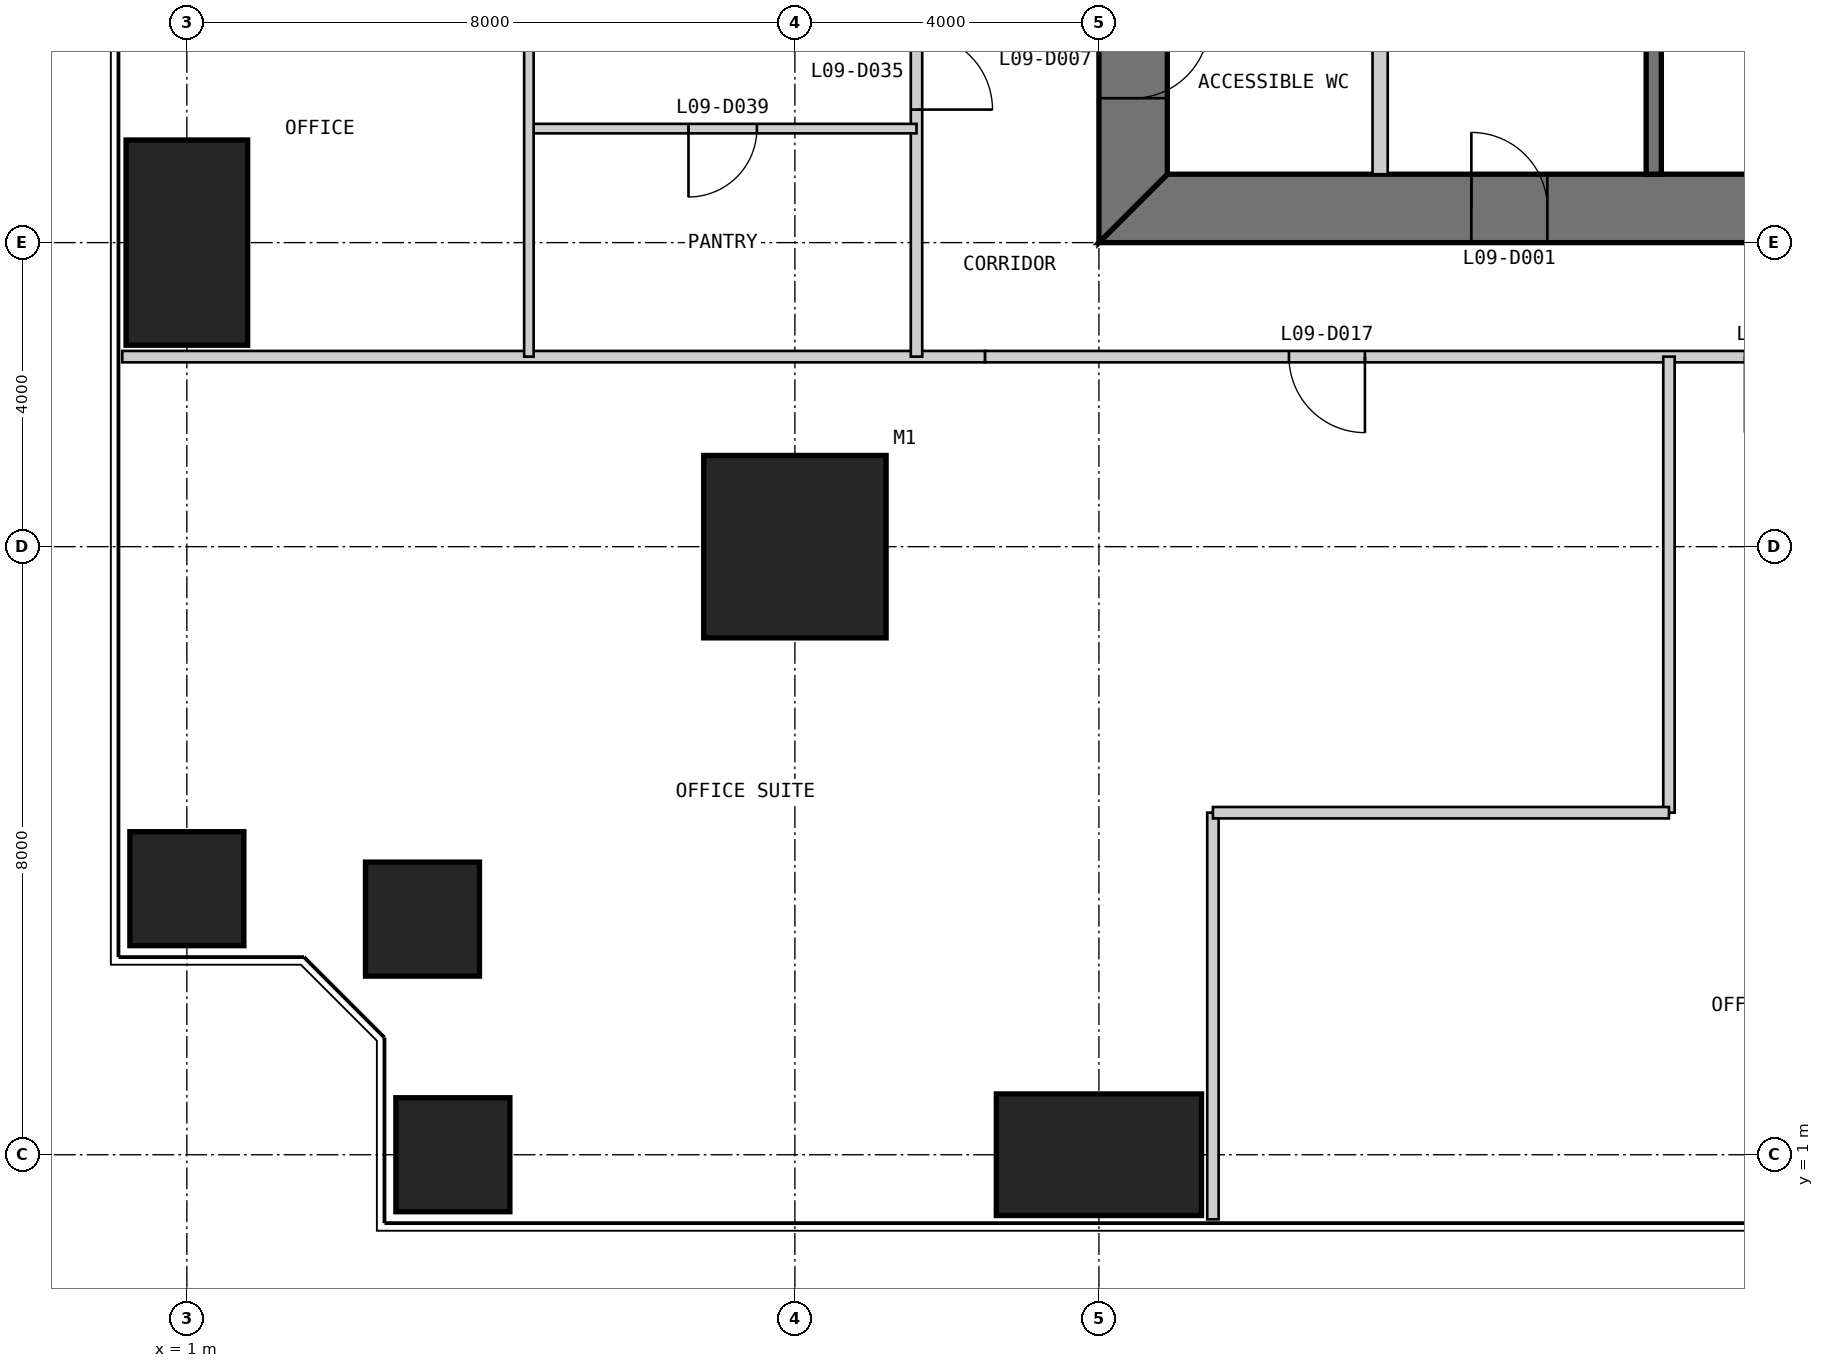
"""IFC4 building model, lengths in metres.
Left out: names, types, materials, properties, quantities, classifications, styles, units other than length and angle.
Written with IfcOpenShell. Run it as: python <this file> out.ifc"""

import sys

from ifc_helpers import new_model, si_unit, direction, frame, frame_2d, origin, origin_2d, place, context, subcontext, project, spatial, polyline, rectangle, outline, extrude, element, fill, save


model = new_model("IFC4")
c1 = context("Model", 3, precision=1e-05, world=origin(), true_north=direction((0.0, 1.0)))
c2 = subcontext(c1, "Body", "Model", "MODEL_VIEW")
j1 = project(units=[si_unit("LENGTHUNIT", "METRE"), si_unit("PLANEANGLEUNIT", "RADIAN")], contexts=[c1])
p1 = place(None, origin())
s1 = spatial("IfcSite", under=j1, at=p1, CompositionType="ELEMENT")
p2 = place(p1, origin())
s2 = spatial("IfcBuilding", under=s1, at=p2, CompositionType="ELEMENT")
p3 = place(p2, frame((0.0, 0.0, 43.0)))
s3 = spatial("IfcBuildingStorey", under=s2, at=p3, CompositionType="ELEMENT", Elevation=43.0)
p4 = place(p3, frame((9.0, 9.0, 0.0), z_axis=(0.0, 0.0, 1.0), x_axis=(1.0, 0.0, 0.0)))
e1 = element("IfcColumn", 1, at=p4, inside=s3, PredefinedType="COLUMN", context=c2, shape_type="SweptSolid", body=[
    extrude(rectangle(XDim=2.4, YDim=2.4, at=origin_2d()), origin(), (0.0, 0.0, 1.0), 4.0),
])
p5 = place(p3, frame((4.5, 1.0, 0.0), z_axis=(0.0, 0.0, 1.0), x_axis=(1.0, 0.0, 0.0)))
e2 = element("IfcColumn", 2, at=p5, inside=s3, PredefinedType="COLUMN", context=c2, shape_type="SweptSolid", body=[
    extrude(rectangle(XDim=1.5, YDim=1.5, at=origin_2d()), origin(), (0.0, 0.0, 1.0), 4.0),
])
p6 = place(p3, frame((13.0, 1.0, 0.0), z_axis=(0.0, 0.0, 1.0), x_axis=(1.0, 0.0, 0.0)))
e3 = element("IfcColumn", 3, at=p6, inside=s3, PredefinedType="COLUMN", context=c2, shape_type="SweptSolid", body=[
    extrude(rectangle(XDim=2.7, YDim=1.6, at=origin_2d()), origin(), (0.0, 0.0, 1.0), 4.0),
])
p7 = place(p3, frame((1.0, 13.0, 0.0), z_axis=(0.0, 0.0, 1.0), x_axis=(1.0, 0.0, 0.0)))
e4 = element("IfcColumn", 4, at=p7, inside=s3, PredefinedType="COLUMN", context=c2, shape_type="SweptSolid", body=[
    extrude(rectangle(XDim=1.6, YDim=2.7, at=origin_2d()), origin(), (0.0, 0.0, 1.0), 4.0),
])
for number, where, z_axis, x_axis in (
    (5, (1.0, 4.5, 0.0), (0.0, 0.0, 1.0), (1.0, 0.0, 0.0)),
    (6, (4.1, 4.1, 0.0), (0.0, 0.0, 1.0), (1.0, 0.0, 0.0)),
):
    element("IfcColumn", number, at=place(p3, frame(where, z_axis=z_axis, x_axis=x_axis)), inside=s3, PredefinedType="COLUMN", context=c2, shape_type="SweptSolid", body=[
        extrude(rectangle(XDim=1.5, YDim=1.5, at=origin_2d()), origin(), (0.0, 0.0, 1.0), 4.0),
    ])
p8 = place(p3, frame((13.0, 13.45, 0.0), z_axis=(0.0, 0.0, 1.0), x_axis=(1.0, 0.0, 0.0)))
e7 = element("IfcWall", 7, at=p8, inside=s3, PredefinedType="SHEAR", context=c2, shape_type="SweptSolid", body=[
    extrude(outline(polyline([(0.0, -0.45), (24.0, -0.45), (23.1, 0.45), (0.9, 0.45), (0.0, -0.45)])), origin(), (0.0, 0.0, 1.0), 4.0),
])
p9 = place(p8, frame((4.9, 0.0, 0.0)))
e8 = element("IfcOpeningElement", 8, at=p9, cuts=e7, PredefinedType="OPENING", context=c2, shape_type="SweptSolid", body=[
    extrude(rectangle(XDim=1.0, YDim=2.2, at=frame_2d((0.5, 1.1))), frame((0.0, 0.46, 0.0), z_axis=(0.0, -1.0, 0.0), x_axis=(1.0, 0.0, 0.0)), (0.0, 0.0, 1.0), 0.92),
])
p10 = place(p8, frame((8.9, 0.0, 0.0)))
e9 = element("IfcOpeningElement", 9, at=p10, cuts=e7, PredefinedType="OPENING", context=c2, shape_type="SweptSolid", body=[
    extrude(rectangle(XDim=1.1, YDim=2.2, at=frame_2d((0.55, 1.1))), frame((0.0, 0.46, 0.0), z_axis=(0.0, -1.0, 0.0), x_axis=(1.0, 0.0, 0.0)), (0.0, 0.0, 1.0), 0.92),
])
p11 = place(p8, frame((15.05, 0.0, 0.0)))
e10 = element("IfcOpeningElement", 10, at=p11, cuts=e7, PredefinedType="OPENING", context=c2, shape_type="SweptSolid", body=[
    extrude(rectangle(XDim=0.9, YDim=2.2, at=frame_2d((0.45, 1.1))), frame((0.0, 0.46, 0.0), z_axis=(0.0, -1.0, 0.0), x_axis=(1.0, 0.0, 0.0)), (0.0, 0.0, 1.0), 0.92),
])
p12 = place(p8, frame((17.9, 0.0, 0.0)))
e11 = element("IfcOpeningElement", 11, at=p12, cuts=e7, PredefinedType="OPENING", context=c2, shape_type="SweptSolid", body=[
    extrude(rectangle(XDim=1.0, YDim=2.2, at=frame_2d((0.5, 1.1))), frame((0.0, 0.46, 0.0), z_axis=(0.0, -1.0, 0.0), x_axis=(1.0, 0.0, 0.0)), (0.0, 0.0, 1.0), 0.92),
])
p13 = place(p8, frame((21.4, 0.0, 0.0)))
e12 = element("IfcOpeningElement", 12, at=p13, cuts=e7, PredefinedType="OPENING", context=c2, shape_type="SweptSolid", body=[
    extrude(rectangle(XDim=1.0, YDim=2.2, at=frame_2d((0.5, 1.1))), frame((0.0, 0.46, 0.0), z_axis=(0.0, -1.0, 0.0), x_axis=(1.0, 0.0, 0.0)), (0.0, 0.0, 1.0), 0.92),
])
p14 = place(p3, frame((13.45, 36.1, 0.0), z_axis=(0.0, 0.0, 1.0), x_axis=(0.0, -1.0, 0.0)))
e13 = element("IfcWall", 13, at=p14, inside=s3, PredefinedType="SHEAR", context=c2, shape_type="SweptSolid", body=[
    extrude(outline(polyline([(-0.9, -0.45), (23.1, -0.45), (22.2, 0.45), (0.0, 0.45), (-0.9, -0.45)])), origin(), (0.0, 0.0, 1.0), 4.0),
])
p15 = place(p14, frame((20.2, 0.0, 0.0)))
e14 = element("IfcOpeningElement", 14, at=p15, cuts=e13, PredefinedType="OPENING", context=c2, shape_type="SweptSolid", body=[
    extrude(rectangle(XDim=1.0, YDim=2.2, at=frame_2d((0.5, 1.1))), frame((0.0, 0.46, 0.0), z_axis=(0.0, -1.0, 0.0), x_axis=(1.0, 0.0, 0.0)), (0.0, 0.0, 1.0), 0.92),
])
p16 = place(p14, frame((17.25, 0.0, 0.0)))
e15 = element("IfcOpeningElement", 15, at=p16, cuts=e13, PredefinedType="OPENING", context=c2, shape_type="SweptSolid", body=[
    extrude(rectangle(XDim=0.9, YDim=2.2, at=frame_2d((0.45, 1.1))), frame((0.0, 0.46, 0.0), z_axis=(0.0, -1.0, 0.0), x_axis=(1.0, 0.0, 0.0)), (0.0, 0.0, 1.0), 0.92),
])
p17 = place(p3, frame((16.7, 13.9, 0.0), z_axis=(0.0, 0.0, 1.0), x_axis=(0.0, 1.0, 0.0)))
e16 = element("IfcWall", 16, at=p17, inside=s3, PredefinedType="PARTITIONING", context=c2, shape_type="SweptSolid", body=[
    extrude(rectangle(XDim=16.1, YDim=0.2, at=frame_2d((8.05, 0.0))), origin(), (0.0, 0.0, 1.0), 3.8),
])
p18 = place(p17, frame((7.217, 0.0, 0.0)))
e17 = element("IfcOpeningElement", 17, at=p18, cuts=e16, PredefinedType="OPENING", context=c2, shape_type="SweptSolid", body=[
    extrude(rectangle(XDim=1.1, YDim=2.2, at=frame_2d((0.55, 1.1))), frame((0.0, 0.11, 0.0), z_axis=(0.0, -1.0, 0.0), x_axis=(1.0, 0.0, 0.0)), (0.0, 0.0, 1.0), 0.22),
])
p19 = place(p17, frame((10.55, 0.0, 0.0)))
e18 = element("IfcOpeningElement", 18, at=p19, cuts=e16, PredefinedType="OPENING", context=c2, shape_type="SweptSolid", body=[
    extrude(rectangle(XDim=1.1, YDim=2.2, at=frame_2d((0.55, 1.1))), frame((0.0, 0.11, 0.0), z_axis=(0.0, -1.0, 0.0), x_axis=(1.0, 0.0, 0.0)), (0.0, 0.0, 1.0), 0.22),
])
p20 = place(p17, frame((13.883, 0.0, 0.0)))
e19 = element("IfcOpeningElement", 19, at=p20, cuts=e16, PredefinedType="OPENING", context=c2, shape_type="SweptSolid", body=[
    extrude(rectangle(XDim=1.1, YDim=2.2, at=frame_2d((0.55, 1.1))), frame((0.0, 0.11, 0.0), z_axis=(0.0, -1.0, 0.0), x_axis=(1.0, 0.0, 0.0)), (0.0, 0.0, 1.0), 0.22),
])
p21 = place(p3, frame((20.3, 13.9, 0.0), z_axis=(0.0, 0.0, 1.0), x_axis=(0.0, 1.0, 0.0)))
e20 = element("IfcWall", 20, at=p21, inside=s3, PredefinedType="SOLIDWALL", context=c2, shape_type="SweptSolid", body=[
    extrude(rectangle(XDim=16.1, YDim=0.2, at=frame_2d((8.05, 0.0))), origin(), (0.0, 0.0, 1.0), 3.8),
])
p22 = place(p3, frame((11.5, 11.5, 0.0), z_axis=(0.0, 0.0, 1.0), x_axis=(1.0, 0.0, 0.0)))
e21 = element("IfcWall", 21, at=p22, inside=s3, PredefinedType="PARTITIONING", context=c2, shape_type="SweptSolid", body=[
    extrude(rectangle(XDim=27.0, YDim=0.15, at=frame_2d((13.5, 0.0))), origin(), (0.0, 0.0, 1.0), 3.85),
])
p23 = place(p22, frame((4.0, 0.0, 0.0)))
e22 = element("IfcOpeningElement", 22, at=p23, cuts=e21, PredefinedType="OPENING", context=c2, shape_type="SweptSolid", body=[
    extrude(rectangle(XDim=1.0, YDim=2.2, at=frame_2d((0.5, 1.1))), frame((0.0, 0.085, 0.0), z_axis=(0.0, -1.0, 0.0), x_axis=(1.0, 0.0, 0.0)), (0.0, 0.0, 1.0), 0.17),
])
p24 = place(p22, frame((10.0, 0.0, 0.0)))
e23 = element("IfcOpeningElement", 23, at=p24, cuts=e21, PredefinedType="OPENING", context=c2, shape_type="SweptSolid", body=[
    extrude(rectangle(XDim=1.0, YDim=2.2, at=frame_2d((0.5, 1.1))), frame((0.0, 0.085, 0.0), z_axis=(0.0, -1.0, 0.0), x_axis=(1.0, 0.0, 0.0)), (0.0, 0.0, 1.0), 0.17),
])
p25 = place(p22, frame((17.5, 0.0, 0.0)))
e24 = element("IfcOpeningElement", 24, at=p25, cuts=e21, PredefinedType="OPENING", context=c2, shape_type="SweptSolid", body=[
    extrude(rectangle(XDim=1.0, YDim=2.2, at=frame_2d((0.5, 1.1))), frame((0.0, 0.085, 0.0), z_axis=(0.0, -1.0, 0.0), x_axis=(1.0, 0.0, 0.0)), (0.0, 0.0, 1.0), 0.17),
])
p26 = place(p22, frame((23.5, 0.0, 0.0)))
e25 = element("IfcOpeningElement", 25, at=p26, cuts=e21, PredefinedType="OPENING", context=c2, shape_type="SweptSolid", body=[
    extrude(rectangle(XDim=1.0, YDim=2.2, at=frame_2d((0.5, 1.1))), frame((0.0, 0.085, 0.0), z_axis=(0.0, -1.0, 0.0), x_axis=(1.0, 0.0, 0.0)), (0.0, 0.0, 1.0), 0.17),
])
p27 = place(p3, frame((0.15, 11.5, 0.0), z_axis=(0.0, 0.0, 1.0), x_axis=(1.0, 0.0, 0.0)))
e26 = element("IfcWall", 26, at=p27, inside=s3, PredefinedType="PARTITIONING", context=c2, shape_type="SweptSolid", body=[
    extrude(rectangle(XDim=11.35, YDim=0.15, at=frame_2d((5.675, 0.0))), origin(), (0.0, 0.0, 1.0), 3.85),
])
p28 = place(p3, frame((14.5, 0.15, 0.0), z_axis=(0.0, 0.0, 1.0), x_axis=(0.0, 1.0, 0.0)))
e27 = element("IfcWall", 27, at=p28, inside=s3, PredefinedType="PARTITIONING", context=c2, shape_type="SweptSolid", body=[
    extrude(rectangle(XDim=5.35, YDim=0.15, at=frame_2d((2.675, 0.0))), origin(), (0.0, 0.0, 1.0), 3.85),
])
for number, where, z_axis, x_axis in (
    (28, (20.5, 5.5, 0.0), (0.0, 0.0, 1.0), (0.0, 1.0, 0.0)),
    (29, (14.5, 5.5, 0.0), (0.0, 0.0, 1.0), (1.0, 0.0, 0.0)),
):
    element("IfcWall", number, at=place(p3, frame(where, z_axis=z_axis, x_axis=x_axis)), inside=s3, PredefinedType="PARTITIONING", context=c2, shape_type="SweptSolid", body=[
        extrude(rectangle(XDim=6.0, YDim=0.15, at=frame_2d((3.0, 0.0))), origin(), (0.0, 0.0, 1.0), 3.85),
    ])
p29 = place(p3, frame((10.6, 38.5, 0.0), z_axis=(0.0, 0.0, 1.0), x_axis=(0.0, -1.0, 0.0)))
e30 = element("IfcWall", 30, at=p29, inside=s3, PredefinedType="PARTITIONING", context=c2, shape_type="SweptSolid", body=[
    extrude(rectangle(XDim=27.0, YDim=0.15, at=frame_2d((13.5, 0.0))), origin(), (0.0, 0.0, 1.0), 3.85),
])
p30 = place(p29, frame((0.25, 0.0, 0.0)))
e31 = element("IfcOpeningElement", 31, at=p30, cuts=e30, PredefinedType="OPENING", context=c2, shape_type="SweptSolid", body=[
    extrude(rectangle(XDim=1.0, YDim=2.2, at=frame_2d((0.5, 1.1))), frame((0.0, 0.085, 0.0), z_axis=(0.0, -1.0, 0.0), x_axis=(1.0, 0.0, 0.0)), (0.0, 0.0, 1.0), 0.17),
])
p31 = place(p29, frame((22.75, 0.0, 0.0)))
e32 = element("IfcOpeningElement", 32, at=p31, cuts=e30, PredefinedType="OPENING", context=c2, shape_type="SweptSolid", body=[
    extrude(rectangle(XDim=1.0, YDim=2.2, at=frame_2d((0.5, 1.1))), frame((0.0, 0.085, 0.0), z_axis=(0.0, -1.0, 0.0), x_axis=(1.0, 0.0, 0.0)), (0.0, 0.0, 1.0), 0.17),
])
p32 = place(p3, frame((5.5, 14.5, 0.0), z_axis=(0.0, 0.0, 1.0), x_axis=(1.0, 0.0, 0.0)))
e33 = element("IfcWall", 33, at=p32, inside=s3, PredefinedType="PARTITIONING", context=c2, shape_type="SweptSolid", body=[
    extrude(rectangle(XDim=5.1, YDim=0.125, at=frame_2d((2.55, 0.0))), origin(), (0.0, 0.0, 1.0), 3.85),
])
p33 = place(p32, frame((2.1, 0.0, 0.0)))
e34 = element("IfcOpeningElement", 34, at=p33, cuts=e33, PredefinedType="OPENING", context=c2, shape_type="SweptSolid", body=[
    extrude(rectangle(XDim=0.9, YDim=2.2, at=frame_2d((0.45, 1.1))), frame((0.0, 0.073, 0.0), z_axis=(0.0, -1.0, 0.0), x_axis=(1.0, 0.0, 0.0)), (0.0, 0.0, 1.0), 0.145),
])
p34 = place(p3, frame((5.5, 29.5, 0.0), z_axis=(0.0, 0.0, 1.0), x_axis=(0.0, -1.0, 0.0)))
e35 = element("IfcWall", 35, at=p34, inside=s3, PredefinedType="PARTITIONING", context=c2, shape_type="SweptSolid", body=[
    extrude(rectangle(XDim=18.0, YDim=0.125, at=frame_2d((9.0, 0.0))), origin(), (0.0, 0.0, 1.0), 3.85),
])
p35 = place(p34, frame((10.0, 0.0, 0.0)))
e36 = element("IfcOpeningElement", 36, at=p35, cuts=e35, PredefinedType="OPENING", context=c2, shape_type="SweptSolid", body=[
    extrude(rectangle(XDim=1.0, YDim=2.2, at=frame_2d((0.5, 1.1))), frame((0.0, 0.073, 0.0), z_axis=(0.0, -1.0, 0.0), x_axis=(1.0, 0.0, 0.0)), (0.0, 0.0, 1.0), 0.145),
])
p36 = place(p34, frame((13.05, 0.0, 0.0)))
e37 = element("IfcOpeningElement", 37, at=p36, cuts=e35, PredefinedType="OPENING", context=c2, shape_type="SweptSolid", body=[
    extrude(rectangle(XDim=0.9, YDim=2.2, at=frame_2d((0.45, 1.1))), frame((0.0, 0.073, 0.0), z_axis=(0.0, -1.0, 0.0), x_axis=(1.0, 0.0, 0.0)), (0.0, 0.0, 1.0), 0.145),
])
p37 = place(p9, origin())
e38 = element("IfcDoor", 38, at=p37, inside=s3, OperationType="SINGLE_SWING_LEFT", PredefinedType="DOOR", context=c2, shape_type="SweptSolid", body=[
    extrude(rectangle(XDim=1.0, YDim=2.2, at=frame_2d((0.5, 1.1))), frame((0.0, 0.025, 0.0), z_axis=(0.0, -1.0, 0.0), x_axis=(1.0, 0.0, 0.0)), (0.0, 0.0, 1.0), 0.05),
    extrude(outline(polyline([(0.0, 0.0), (0.04, 0.0), (0.04, 2.16), (0.96, 2.16), (0.96, 0.0), (1.0, 0.0), (1.0, 2.2), (0.0, 2.2), (0.0, 0.0)])), frame((0.0, 0.3, 0.0), z_axis=(0.0, -1.0, 0.0), x_axis=(1.0, 0.0, 0.0)), (0.0, 0.0, 1.0), 0.6),
])
fill(e8, e38)
p38 = place(p15, origin())
e39 = element("IfcDoor", 39, at=p38, inside=s3, OperationType="SINGLE_SWING_LEFT", PredefinedType="DOOR", context=c2, shape_type="SweptSolid", body=[
    extrude(rectangle(XDim=1.0, YDim=2.2, at=frame_2d((0.5, 1.1))), frame((0.0, 0.025, 0.0), z_axis=(0.0, -1.0, 0.0), x_axis=(1.0, 0.0, 0.0)), (0.0, 0.0, 1.0), 0.05),
    extrude(outline(polyline([(0.0, 0.0), (0.04, 0.0), (0.04, 2.16), (0.96, 2.16), (0.96, 0.0), (1.0, 0.0), (1.0, 2.2), (0.0, 2.2), (0.0, 0.0)])), frame((0.0, 0.3, 0.0), z_axis=(0.0, -1.0, 0.0), x_axis=(1.0, 0.0, 0.0)), (0.0, 0.0, 1.0), 0.6),
])
fill(e14, e39)
p39 = place(p23, frame((1.0, 0.0, 0.0), z_axis=(0.0, 0.0, 1.0), x_axis=(-1.0, 0.0, 0.0)))
e40 = element("IfcDoor", 40, at=p39, inside=s3, OperationType="SINGLE_SWING_LEFT", PredefinedType="DOOR", context=c2, shape_type="SweptSolid", body=[
    extrude(rectangle(XDim=1.0, YDim=2.2, at=frame_2d((0.5, 1.1))), frame((0.0, 0.025, 0.0), z_axis=(0.0, -1.0, 0.0), x_axis=(1.0, 0.0, 0.0)), (0.0, 0.0, 1.0), 0.05),
])
fill(e22, e40)
p40 = place(p31, origin())
e41 = element("IfcDoor", 41, at=p40, inside=s3, OperationType="SINGLE_SWING_RIGHT", PredefinedType="DOOR", context=c2, shape_type="SweptSolid", body=[
    extrude(rectangle(XDim=1.0, YDim=2.2, at=frame_2d((0.5, 1.1))), frame((0.0, 0.025, 0.0), z_axis=(0.0, -1.0, 0.0), x_axis=(1.0, 0.0, 0.0)), (0.0, 0.0, 1.0), 0.05),
])
fill(e32, e41)
p41 = place(p33, frame((0.9, 0.0, 0.0), z_axis=(0.0, 0.0, 1.0), x_axis=(-1.0, 0.0, 0.0)))
e42 = element("IfcDoor", 42, at=p41, inside=s3, OperationType="SINGLE_SWING_RIGHT", PredefinedType="DOOR", context=c2, shape_type="SweptSolid", body=[
    extrude(rectangle(XDim=0.9, YDim=2.2, at=frame_2d((0.45, 1.1))), frame((0.0, 0.025, 0.0), z_axis=(0.0, -1.0, 0.0), x_axis=(1.0, 0.0, 0.0)), (0.0, 0.0, 1.0), 0.05),
])
fill(e34, e42)
save(model, sys.argv[1])
